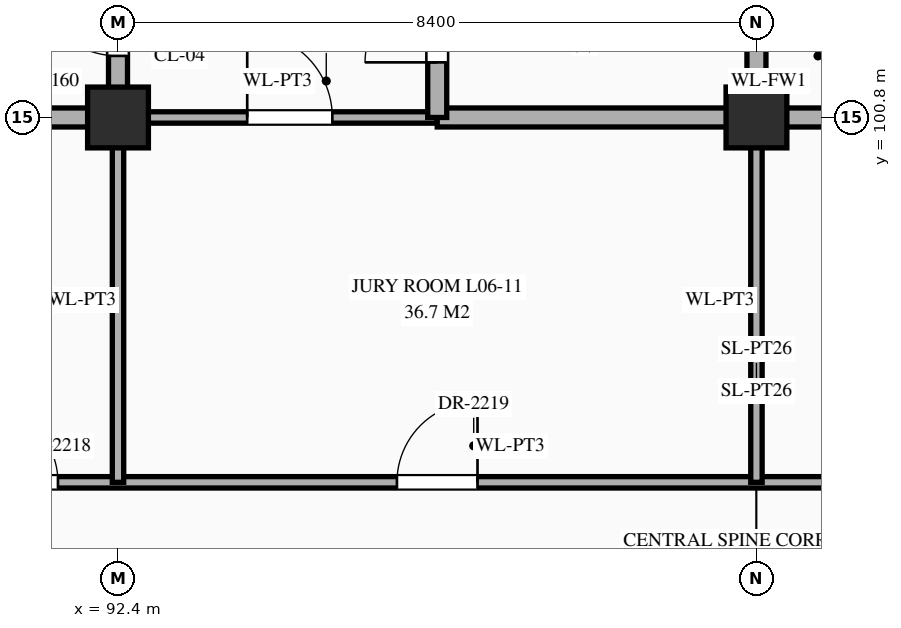
"""IFC4 building model, lengths in metres.
Left out: names, types, materials, properties, quantities, classifications, styles, units other than length and angle.
Written with IfcOpenShell. Run it as: python <this file> out.ifc"""

import sys

from ifc_helpers import new_model, si_unit, direction, frame, frame_2d, origin, origin_2d, place, context, subcontext, project, spatial, rectangle, extrude, element, fill, save


model = new_model("IFC4")
c1 = context("Model", 3, precision=1e-05, world=origin(), true_north=direction((0.0, 1.0)))
c2 = subcontext(c1, "Body", "Model", "MODEL_VIEW")
j1 = project(units=[si_unit("LENGTHUNIT", "METRE"), si_unit("PLANEANGLEUNIT", "RADIAN")], contexts=[c1])
p1 = place(None, origin())
s1 = spatial("IfcSite", under=j1, at=p1, CompositionType="ELEMENT")
p2 = place(p1, origin())
s2 = spatial("IfcBuilding", under=s1, at=p2, CompositionType="ELEMENT")
p3 = place(p2, frame((0.0, 0.0, 26.1)))
s3 = spatial("IfcBuildingStorey", under=s2, at=p3, CompositionType="ELEMENT", Elevation=26.1)
for number, where, z_axis, x_axis in (
    (1, (92.4, 100.8, 0.0), (0.0, 0.0, 1.0), (1.0, 0.0, 0.0)),
    (2, (100.8, 100.8, 0.0), (0.0, 0.0, 1.0), (1.0, 0.0, 0.0)),
):
    element("IfcColumn", number, at=place(p3, frame(where, z_axis=z_axis, x_axis=x_axis)), inside=s3, PredefinedType="COLUMN", context=c2, shape_type="SweptSolid", body=[
        extrude(rectangle(XDim=0.8, YDim=0.8, at=origin_2d()), origin(), (0.0, 0.0, 1.0), 4.5),
    ])
p4 = place(p3, frame((89.8, 96.0, 0.0), z_axis=(0.0, 0.0, 1.0), x_axis=(1.0, 0.0, 0.0)))
e3 = element("IfcWall", 3, at=p4, inside=s3, PredefinedType="STANDARD", context=c2, shape_type="SweptSolid", body=[
    extrude(rectangle(XDim=19.4, YDim=0.15, at=frame_2d((9.7, 0.0))), origin(), (0.0, 0.0, 1.0), 4.24),
])
p5 = place(p4, frame((0.79, 0.0, 0.0)))
e4 = element("IfcOpeningElement", 4, at=p5, cuts=e3, PredefinedType="OPENING", context=c2, shape_type="SweptSolid", body=[
    extrude(rectangle(XDim=1.02, YDim=2.4, at=frame_2d((0.51, 1.2))), frame((0.0, 0.087, 0.0), z_axis=(0.0, -1.0, 0.0), x_axis=(1.0, 0.0, 0.0)), (0.0, 0.0, 1.0), 0.174),
])
p6 = place(p4, frame((6.27, 0.0, 0.0)))
e5 = element("IfcOpeningElement", 5, at=p6, cuts=e3, PredefinedType="OPENING", context=c2, shape_type="SweptSolid", body=[
    extrude(rectangle(XDim=1.06, YDim=2.4, at=frame_2d((0.53, 1.2))), frame((0.0, 0.087, 0.0), z_axis=(0.0, -1.0, 0.0), x_axis=(1.0, 0.0, 0.0)), (0.0, 0.0, 1.0), 0.174),
])
p7 = place(p4, frame((14.63, 0.0, 0.0)))
e6 = element("IfcOpeningElement", 6, at=p7, cuts=e3, PredefinedType="OPENING", context=c2, shape_type="SweptSolid", body=[
    extrude(rectangle(XDim=1.14, YDim=2.4, at=frame_2d((0.57, 1.2))), frame((0.0, 0.087, 0.0), z_axis=(0.0, -1.0, 0.0), x_axis=(1.0, 0.0, 0.0)), (0.0, 0.0, 1.0), 0.174),
])
p8 = place(p3, frame((75.6, 100.8, 0.0), z_axis=(0.0, 0.0, 1.0), x_axis=(1.0, 0.0, 0.0)))
e7 = element("IfcWall", 7, at=p8, inside=s3, PredefinedType="STANDARD", context=c2, shape_type="SweptSolid", body=[
    extrude(rectangle(XDim=16.8, YDim=0.25, at=frame_2d((8.4, 0.0))), origin(), (0.0, 0.0, 1.0), 3.39),
])
p9 = place(p8, frame((3.725, 0.0, 0.0)))
e8 = element("IfcOpeningElement", 8, at=p9, cuts=e7, PredefinedType="OPENING", context=c2, shape_type="SweptSolid", body=[
    extrude(rectangle(XDim=0.95, YDim=2.15, at=frame_2d((0.475, 1.075))), frame((0.0, 0.137, 0.0), z_axis=(0.0, -1.0, 0.0), x_axis=(1.0, 0.0, 0.0)), (0.0, 0.0, 1.0), 0.274),
])
p10 = place(p8, frame((9.76, 0.0, 0.0)))
e9 = element("IfcOpeningElement", 9, at=p10, cuts=e7, PredefinedType="OPENING", context=c2, shape_type="SweptSolid", body=[
    extrude(rectangle(XDim=1.0, YDim=2.2, at=frame_2d((0.5, 1.1))), frame((0.0, 0.137, 0.0), z_axis=(0.0, -1.0, 0.0), x_axis=(1.0, 0.0, 0.0)), (0.0, 0.0, 1.0), 0.274),
])
p11 = place(p8, frame((12.525, 0.0, 0.0)))
e10 = element("IfcOpeningElement", 10, at=p11, cuts=e7, PredefinedType="OPENING", context=c2, shape_type="SweptSolid", body=[
    extrude(rectangle(XDim=0.95, YDim=2.15, at=frame_2d((0.475, 1.075))), frame((0.0, 0.137, 0.0), z_axis=(0.0, -1.0, 0.0), x_axis=(1.0, 0.0, 0.0)), (0.0, 0.0, 1.0), 0.274),
])
p12 = place(p8, frame((14.79, 0.0, 0.0)))
e11 = element("IfcOpeningElement", 11, at=p12, cuts=e7, PredefinedType="OPENING", context=c2, shape_type="SweptSolid", body=[
    extrude(rectangle(XDim=1.1, YDim=2.2, at=frame_2d((0.55, 1.1))), frame((0.0, 0.137, 0.0), z_axis=(0.0, -1.0, 0.0), x_axis=(1.0, 0.0, 0.0)), (0.0, 0.0, 1.0), 0.274),
])
p13 = place(p3, frame((92.4, 100.8, 0.0), z_axis=(0.0, 0.0, 1.0), x_axis=(1.0, 0.0, 0.0)))
e12 = element("IfcWall", 12, at=p13, inside=s3, PredefinedType="STANDARD", context=c2, shape_type="SweptSolid", body=[
    extrude(rectangle(XDim=4.2, YDim=0.15, at=frame_2d((2.1, 0.0))), origin(), (0.0, 0.0, 1.0), 3.39),
])
p14 = place(p13, frame((1.7, 0.0, 0.0)))
e13 = element("IfcOpeningElement", 13, at=p14, cuts=e12, PredefinedType="OPENING", context=c2, shape_type="SweptSolid", body=[
    extrude(rectangle(XDim=1.12, YDim=2.25, at=frame_2d((0.56, 1.125))), frame((0.0, 0.087, 0.0), z_axis=(0.0, -1.0, 0.0), x_axis=(1.0, 0.0, 0.0)), (0.0, 0.0, 1.0), 0.174),
])
p15 = place(p3, frame((96.6, 100.8, 0.0), z_axis=(0.0, 0.0, 1.0), x_axis=(1.0, 0.0, 0.0)))
e14 = element("IfcWall", 14, at=p15, inside=s3, PredefinedType="STANDARD", context=c2, shape_type="SweptSolid", body=[
    extrude(rectangle(XDim=12.6, YDim=0.25, at=frame_2d((6.3, 0.0))), origin(), (0.0, 0.0, 1.0), 3.39),
])
p16 = place(p15, frame((7.9, 0.0, 0.0)))
e15 = element("IfcOpeningElement", 15, at=p16, cuts=e14, PredefinedType="OPENING", context=c2, shape_type="SweptSolid", body=[
    extrude(rectangle(XDim=1.0, YDim=2.2, at=frame_2d((0.5, 1.1))), frame((0.0, 0.137, 0.0), z_axis=(0.0, -1.0, 0.0), x_axis=(1.0, 0.0, 0.0)), (0.0, 0.0, 1.0), 0.274),
])
p17 = place(p3, frame((92.4, 96.0, 0.0), z_axis=(0.0, 0.0, 1.0), x_axis=(0.0, 1.0, 0.0)))
e16 = element("IfcWall", 16, at=p17, inside=s3, PredefinedType="STANDARD", context=c2, shape_type="SweptSolid", body=[
    extrude(rectangle(XDim=4.8, YDim=0.15, at=frame_2d((2.4, 0.0))), origin(), (0.0, 0.0, 1.0), 3.49),
])
p18 = place(p3, frame((92.4, 100.8, 0.0), z_axis=(0.0, 0.0, 1.0), x_axis=(0.0, 1.0, 0.0)))
e17 = element("IfcWall", 17, at=p18, inside=s3, PredefinedType="STANDARD", context=c2, shape_type="SweptSolid", body=[
    extrude(rectangle(XDim=3.6, YDim=0.25, at=frame_2d((1.8, 0.0))), origin(), (0.0, 0.0, 1.0), 3.49),
])
p19 = place(p18, frame((0.81, 0.0, 0.0)))
e18 = element("IfcOpeningElement", 18, at=p19, cuts=e17, PredefinedType="OPENING", context=c2, shape_type="SweptSolid", body=[
    extrude(rectangle(XDim=1.1, YDim=2.2, at=frame_2d((0.55, 1.1))), frame((0.0, 0.137, 0.0), z_axis=(0.0, -1.0, 0.0), x_axis=(1.0, 0.0, 0.0)), (0.0, 0.0, 1.0), 0.274),
])
p20 = place(p3, frame((96.6, 100.8, 0.0), z_axis=(0.0, 0.0, 1.0), x_axis=(0.0, 1.0, 0.0)))
e19 = element("IfcWall", 19, at=p20, inside=s3, PredefinedType="STANDARD", context=c2, shape_type="SweptSolid", body=[
    extrude(rectangle(XDim=3.6, YDim=0.25, at=frame_2d((1.8, 0.0))), origin(), (0.0, 0.0, 1.0), 3.89),
])
p21 = place(p20, frame((0.725, 0.0, 0.0)))
e20 = element("IfcOpeningElement", 20, at=p21, cuts=e19, PredefinedType="OPENING", context=c2, shape_type="SweptSolid", body=[
    extrude(rectangle(XDim=0.95, YDim=2.15, at=frame_2d((0.475, 1.075))), frame((0.0, 0.137, 0.0), z_axis=(0.0, -1.0, 0.0), x_axis=(1.0, 0.0, 0.0)), (0.0, 0.0, 1.0), 0.274),
])
p22 = place(p3, frame((100.8, 96.0, 0.0), z_axis=(0.0, 0.0, 1.0), x_axis=(0.0, 1.0, 0.0)))
e21 = element("IfcWall", 21, at=p22, inside=s3, PredefinedType="STANDARD", context=c2, shape_type="SweptSolid", body=[
    extrude(rectangle(XDim=4.8, YDim=0.15, at=frame_2d((2.4, 0.0))), origin(), (0.0, 0.0, 1.0), 3.49),
])
p23 = place(p3, frame((100.8, 100.8, 0.0), z_axis=(0.0, 0.0, 1.0), x_axis=(0.0, 1.0, 0.0)))
e22 = element("IfcWall", 22, at=p23, inside=s3, PredefinedType="STANDARD", context=c2, shape_type="SweptSolid", body=[
    extrude(rectangle(XDim=2.4, YDim=0.25, at=frame_2d((1.2, 0.0))), origin(), (0.0, 0.0, 1.0), 3.49),
])
p24 = place(p23, frame((0.885, 0.0, 0.0)))
e23 = element("IfcOpeningElement", 23, at=p24, cuts=e22, PredefinedType="OPENING", context=c2, shape_type="SweptSolid", body=[
    extrude(rectangle(XDim=0.95, YDim=2.15, at=frame_2d((0.475, 1.075))), frame((0.0, 0.137, 0.0), z_axis=(0.0, -1.0, 0.0), x_axis=(1.0, 0.0, 0.0)), (0.0, 0.0, 1.0), 0.274),
])
p25 = place(p21, origin())
e24 = element("IfcDoor", 24, at=p25, inside=s3, OperationType="SINGLE_SWING_LEFT", PredefinedType="DOOR", context=c2, shape_type="SweptSolid", body=[
    extrude(rectangle(XDim=0.95, YDim=2.15, at=frame_2d((0.475, 1.075))), frame((0.0, 0.025, 0.0), z_axis=(0.0, -1.0, 0.0), x_axis=(1.0, 0.0, 0.0)), (0.0, 0.0, 1.0), 0.05),
])
fill(e20, e24)
p26 = place(p19, origin())
e25 = element("IfcDoor", 25, at=p26, inside=s3, OperationType="SINGLE_SWING_RIGHT", PredefinedType="DOOR", context=c2, shape_type="SweptSolid", body=[
    extrude(rectangle(XDim=1.1, YDim=2.2, at=frame_2d((0.55, 1.1))), frame((0.0, 0.025, 0.0), z_axis=(0.0, -1.0, 0.0), x_axis=(1.0, 0.0, 0.0)), (0.0, 0.0, 1.0), 0.05),
])
fill(e18, e25)
p27 = place(p14, origin())
e26 = element("IfcDoor", 26, at=p27, inside=s3, OperationType="SINGLE_SWING_LEFT", PredefinedType="DOOR", context=c2, shape_type="SweptSolid", body=[
    extrude(rectangle(XDim=1.12, YDim=2.25, at=frame_2d((0.56, 1.125))), frame((0.0, 0.025, 0.0), z_axis=(0.0, -1.0, 0.0), x_axis=(1.0, 0.0, 0.0)), (0.0, 0.0, 1.0), 0.05),
])
fill(e13, e26)
p28 = place(p5, origin())
e27 = element("IfcDoor", 27, at=p28, inside=s3, OperationType="SINGLE_SWING_LEFT", PredefinedType="DOOR", context=c2, shape_type="SweptSolid", body=[
    extrude(rectangle(XDim=1.02, YDim=2.4, at=frame_2d((0.51, 1.2))), frame((0.0, 0.025, 0.0), z_axis=(0.0, -1.0, 0.0), x_axis=(1.0, 0.0, 0.0)), (0.0, 0.0, 1.0), 0.05),
])
fill(e4, e27)
p29 = place(p6, origin())
e28 = element("IfcDoor", 28, at=p29, inside=s3, OperationType="SINGLE_SWING_RIGHT", PredefinedType="DOOR", context=c2, shape_type="SweptSolid", body=[
    extrude(rectangle(XDim=1.06, YDim=2.4, at=frame_2d((0.53, 1.2))), frame((0.0, 0.025, 0.0), z_axis=(0.0, -1.0, 0.0), x_axis=(1.0, 0.0, 0.0)), (0.0, 0.0, 1.0), 0.05),
])
fill(e5, e28)
save(model, sys.argv[1])
